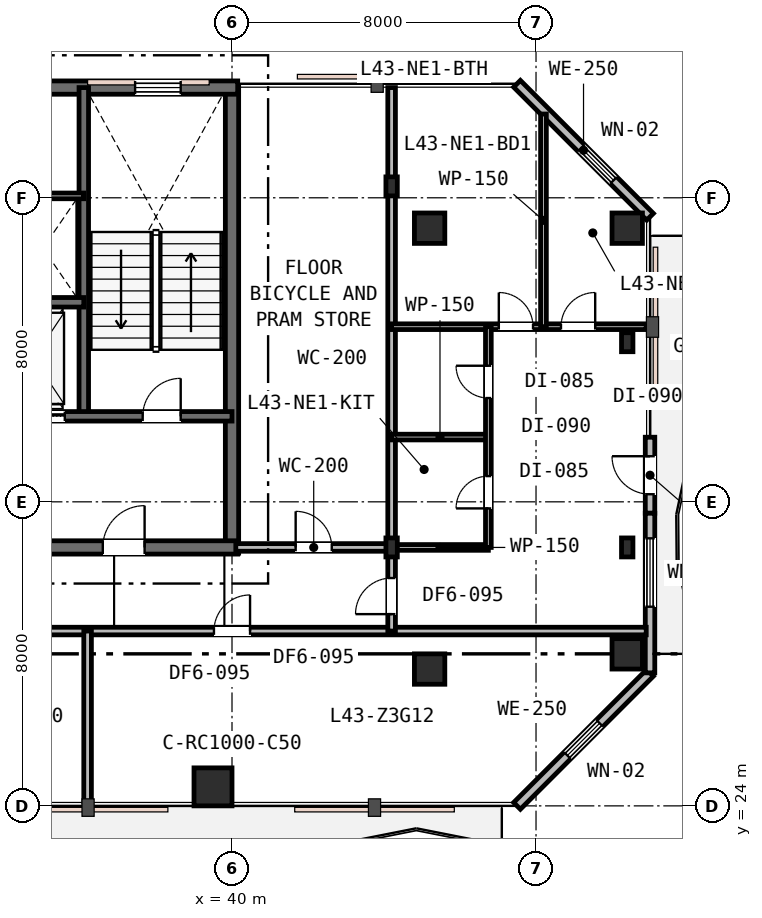
"""IFC4 building model, lengths in metres.
Left out: names, types, materials, properties, quantities, classifications, styles, units other than length and angle.
Written with IfcOpenShell. Run it as: python <this file> out.ifc"""

import sys

from ifc_helpers import new_model, si_unit, direction, frame, frame_2d, origin, origin_2d, place, context, subcontext, project, spatial, rectangle, i_section, extrude, element, fill, save


model = new_model("IFC4")
c1 = context("Model", 3, precision=1e-05, world=origin(), true_north=direction((0.0, 1.0)))
c2 = subcontext(c1, "Body", "Model", "MODEL_VIEW")
j1 = project(units=[si_unit("LENGTHUNIT", "METRE"), si_unit("PLANEANGLEUNIT", "RADIAN")], contexts=[c1])
p1 = place(None, origin())
s1 = spatial("IfcSite", under=j1, at=p1, CompositionType="ELEMENT")
p2 = place(p1, origin())
s2 = spatial("IfcBuilding", under=s1, at=p2, CompositionType="ELEMENT")
p3 = place(p2, frame((0.0, 0.0, 168.6)))
s3 = spatial("IfcBuildingStorey", under=s2, at=p3, CompositionType="ELEMENT", Elevation=168.6)
p4 = place(p3, frame((40.0, 30.65, 0.0), z_axis=(0.0, 0.0, 1.0), x_axis=(0.0, 1.0, 0.0)))
e1 = element("IfcWall", 1, at=p4, inside=s3, PredefinedType="SHEAR", context=c2, shape_type="SweptSolid", body=[
    extrude(rectangle(XDim=12.3, YDim=0.35, at=frame_2d((6.15, 0.0))), origin(), (0.0, 0.0, 1.0), 3.6),
])
p5 = place(p3, frame((15.85, 42.9, 0.0), z_axis=(0.0, 0.0, 1.0), x_axis=(1.0, 0.0, 0.0)))
e2 = element("IfcWall", 2, at=p5, inside=s3, PredefinedType="SHEAR", context=c2, shape_type="SweptSolid", body=[
    extrude(rectangle(XDim=24.3, YDim=0.35, at=frame_2d((12.15, 0.0))), origin(), (0.0, 0.0, 1.0), 3.6),
])
p6 = place(p5, frame((1.6, 0.0, 0.95)))
e3 = element("IfcOpeningElement", 3, at=p6, cuts=e2, PredefinedType="OPENING", context=c2, shape_type="SweptSolid", body=[
    extrude(rectangle(XDim=1.2, YDim=1.6, at=frame_2d((0.6, 0.8))), frame((0.0, 0.185, 0.0), z_axis=(0.0, -1.0, 0.0), x_axis=(1.0, 0.0, 0.0)), (0.0, 0.0, 1.0), 0.37),
])
p7 = place(p5, frame((16.5, 0.0, 0.95)))
e4 = element("IfcOpeningElement", 4, at=p7, cuts=e2, PredefinedType="OPENING", context=c2, shape_type="SweptSolid", body=[
    extrude(rectangle(XDim=1.2, YDim=1.6, at=frame_2d((0.6, 0.8))), frame((0.0, 0.185, 0.0), z_axis=(0.0, -1.0, 0.0), x_axis=(1.0, 0.0, 0.0)), (0.0, 0.0, 1.0), 0.37),
])
p8 = place(p5, frame((21.6, 0.0, 0.95)))
e5 = element("IfcOpeningElement", 5, at=p8, cuts=e2, PredefinedType="OPENING", context=c2, shape_type="SweptSolid", body=[
    extrude(rectangle(XDim=1.2, YDim=1.6, at=frame_2d((0.6, 0.8))), frame((0.0, 0.185, 0.0), z_axis=(0.0, -1.0, 0.0), x_axis=(1.0, 0.0, 0.0)), (0.0, 0.0, 1.0), 0.37),
])
p9 = place(p3, frame((28.95, 30.8, 0.0), z_axis=(0.0, 0.0, 1.0), x_axis=(1.0, 0.0, 0.0)))
e6 = element("IfcWall", 6, at=p9, inside=s3, PredefinedType="SHEAR", context=c2, shape_type="SweptSolid", body=[
    extrude(rectangle(XDim=11.2, YDim=0.35, at=frame_2d((5.6, 0.0))), origin(), (0.0, 0.0, 1.0), 3.6),
])
p10 = place(p9, frame((7.65, 0.0, 0.0)))
e7 = element("IfcOpeningElement", 7, at=p10, cuts=e6, PredefinedType="OPENING", context=c2, shape_type="SweptSolid", body=[
    extrude(rectangle(XDim=1.1, YDim=2.15, at=frame_2d((0.55, 1.075))), frame((0.0, 0.185, 0.0), z_axis=(0.0, -1.0, 0.0), x_axis=(1.0, 0.0, 0.0)), (0.0, 0.0, 1.0), 0.37),
])
p11 = place(p3, frame((36.1, 34.25, 0.0), z_axis=(0.0, 0.0, 1.0), x_axis=(0.0, 1.0, 0.0)))
e8 = element("IfcWall", 8, at=p11, inside=s3, PredefinedType="SHEAR", context=c2, shape_type="SweptSolid", body=[
    extrude(rectangle(XDim=8.65, YDim=0.25, at=frame_2d((4.325, 0.0))), origin(), (0.0, 0.0, 1.0), 3.6),
])
p12 = place(p3, frame((33.95, 34.25, 0.0), z_axis=(0.0, 0.0, 1.0), x_axis=(1.0, 0.0, 0.0)))
e9 = element("IfcWall", 9, at=p12, inside=s3, PredefinedType="SHEAR", context=c2, shape_type="SweptSolid", body=[
    extrude(rectangle(XDim=6.05, YDim=0.25, at=frame_2d((3.025, 0.0))), origin(), (0.0, 0.0, 1.0), 3.6),
])
p13 = place(p12, frame((3.7, 0.0, 0.0)))
e10 = element("IfcOpeningElement", 10, at=p13, cuts=e9, PredefinedType="OPENING", context=c2, shape_type="SweptSolid", body=[
    extrude(rectangle(XDim=1.0, YDim=2.15, at=frame_2d((0.5, 1.075))), frame((0.0, 0.135, 0.0), z_axis=(0.0, -1.0, 0.0), x_axis=(1.0, 0.0, 0.0)), (0.0, 0.0, 1.0), 0.27),
])
p14 = place(p12, frame((0.55, 0.0, 0.0)))
e11 = element("IfcOpeningElement", 11, at=p14, cuts=e9, PredefinedType="OPENING", context=c2, shape_type="SweptSolid", body=[
    extrude(rectangle(XDim=1.1, YDim=2.15, at=frame_2d((0.55, 1.075))), frame((0.0, 0.135, 0.0), z_axis=(0.0, -1.0, 0.0), x_axis=(1.0, 0.0, 0.0)), (0.0, 0.0, 1.0), 0.27),
])
p15 = place(p3, frame((19.9, 37.25, 0.0), z_axis=(0.0, 0.0, 1.0), x_axis=(1.0, 0.0, 0.0)))
e12 = element("IfcWall", 12, at=p15, inside=s3, PredefinedType="SHEAR", context=c2, shape_type="SweptSolid", body=[
    extrude(rectangle(XDim=16.2, YDim=0.25, at=frame_2d((8.1, 0.0))), origin(), (0.0, 0.0, 1.0), 3.6),
])
p16 = place(p15, frame((12.55, 0.0, 0.0)))
e13 = element("IfcOpeningElement", 13, at=p16, cuts=e12, PredefinedType="OPENING", context=c2, shape_type="SweptSolid", body=[
    extrude(rectangle(XDim=0.9, YDim=2.15, at=frame_2d((0.45, 1.075))), frame((0.0, 0.135, 0.0), z_axis=(0.0, -1.0, 0.0), x_axis=(1.0, 0.0, 0.0)), (0.0, 0.0, 1.0), 0.27),
])
p17 = place(p15, frame((2.5, 0.0, 0.0)))
e14 = element("IfcOpeningElement", 14, at=p17, cuts=e12, PredefinedType="OPENING", context=c2, shape_type="SweptSolid", body=[
    extrude(rectangle(XDim=1.05, YDim=2.15, at=frame_2d((0.525, 1.075))), frame((0.0, 0.135, 0.0), z_axis=(0.0, -1.0, 0.0), x_axis=(1.0, 0.0, 0.0)), (0.0, 0.0, 1.0), 0.27),
])
p18 = place(p15, frame((4.4, 0.0, 0.0)))
e15 = element("IfcOpeningElement", 15, at=p18, cuts=e12, PredefinedType="OPENING", context=c2, shape_type="SweptSolid", body=[
    extrude(rectangle(XDim=1.05, YDim=2.15, at=frame_2d((0.525, 1.075))), frame((0.0, 0.135, 0.0), z_axis=(0.0, -1.0, 0.0), x_axis=(1.0, 0.0, 0.0)), (0.0, 0.0, 1.0), 0.27),
])
p19 = place(p15, frame((6.3, 0.0, 0.0)))
e16 = element("IfcOpeningElement", 16, at=p19, cuts=e12, PredefinedType="OPENING", context=c2, shape_type="SweptSolid", body=[
    extrude(rectangle(XDim=1.05, YDim=2.15, at=frame_2d((0.525, 1.075))), frame((0.0, 0.135, 0.0), z_axis=(0.0, -1.0, 0.0), x_axis=(1.0, 0.0, 0.0)), (0.0, 0.0, 1.0), 0.27),
])
p20 = place(p3, frame((39.5, 24.5, 0.0), z_axis=(0.0, 0.0, 1.0), x_axis=(1.0, 0.0, 0.0)))
e17 = element("IfcColumn", 17, at=p20, inside=s3, PredefinedType="COLUMN", context=c2, shape_type="SweptSolid", body=[
    extrude(rectangle(XDim=1.0, YDim=1.0, at=origin_2d()), origin(), (0.0, 0.0, 1.0), 3.6),
])
for number, where, z_axis, x_axis in (
    (18, (45.2, 27.6, 0.0), (0.0, 0.0, 1.0), (1.0, 0.0, 0.0)),
    (19, (45.2, 39.2, 0.0), (0.0, 0.0, 1.0), (1.0, 0.0, 0.0)),
    (20, (50.4, 28.0, 0.0), (0.0, 0.0, 1.0), (1.0, 0.0, 0.0)),
    (21, (50.4, 39.2, 0.0), (0.0, 0.0, 1.0), (1.0, 0.0, 0.0)),
):
    element("IfcColumn", number, at=place(p3, frame(where, z_axis=z_axis, x_axis=x_axis)), inside=s3, PredefinedType="COLUMN", context=c2, shape_type="SweptSolid", body=[
        extrude(rectangle(XDim=0.8, YDim=0.8, at=origin_2d()), origin(), (0.0, 0.0, 1.0), 3.6),
    ])
for number, where, z_axis, x_axis in (
    (22, (44.2, 30.8, 0.0), (0.0, 0.0, 1.0), (1.0, 0.0, 0.0)),
    (23, (44.2, 40.3, 0.0), (0.0, 0.0, 1.0), (1.0, 0.0, 0.0)),
    (24, (50.4, 30.8, 0.0), (0.0, 0.0, 1.0), (1.0, 0.0, 0.0)),
    (25, (50.4, 36.2, 0.0), (0.0, 0.0, 1.0), (1.0, 0.0, 0.0)),
):
    element("IfcColumn", number, at=place(p3, frame(where, z_axis=z_axis, x_axis=x_axis)), inside=s3, PredefinedType="COLUMN", context=c2, shape_type="SweptSolid", body=[
        extrude(i_section(OverallWidth=0.3, OverallDepth=0.5, WebThickness=0.015, FlangeThickness=0.028, FilletRadius=0.027, at=origin_2d()), origin(), (0.0, 0.0, 1.0), 3.6),
    ])
p21 = place(p3, frame((47.5, 24.0, 0.0), z_axis=(0.0, 0.0, 1.0), x_axis=(0.707106781187, 0.707106781187, 0.0)))
e26 = element("IfcWall", 26, at=p21, inside=s3, PredefinedType="STANDARD", context=c2, shape_type="SweptSolid", body=[
    extrude(rectangle(XDim=4.95, YDim=0.25, at=frame_2d((2.475, 0.0))), origin(), (0.0, 0.0, 1.0), 3.33),
])
p22 = place(p21, frame((1.875, 0.0, 0.85)))
e27 = element("IfcOpeningElement", 27, at=p22, cuts=e26, PredefinedType="OPENING", context=c2, shape_type="SweptSolid", body=[
    extrude(rectangle(XDim=1.2, YDim=1.6, at=frame_2d((0.6, 0.8))), frame((0.0, 0.135, 0.0), z_axis=(0.0, -1.0, 0.0), x_axis=(1.0, 0.0, 0.0)), (0.0, 0.0, 1.0), 0.27),
])
p23 = place(p3, frame((51.0, 31.7, 0.0), z_axis=(0.0, 0.0, 1.0), x_axis=(0.0, 1.0, 0.0)))
e28 = element("IfcWall", 28, at=p23, inside=s3, PredefinedType="STANDARD", context=c2, shape_type="SweptSolid", body=[
    extrude(rectangle(XDim=2.0, YDim=0.25, at=frame_2d((1.0, 0.0))), origin(), (0.0, 0.0, 1.0), 3.33),
])
p24 = place(p23, frame((0.5, 0.0, 0.0)))
e29 = element("IfcOpeningElement", 29, at=p24, cuts=e28, PredefinedType="OPENING", context=c2, shape_type="SweptSolid", body=[
    extrude(rectangle(XDim=1.0, YDim=2.15, at=frame_2d((0.5, 1.075))), frame((0.0, 0.135, 0.0), z_axis=(0.0, -1.0, 0.0), x_axis=(1.0, 0.0, 0.0)), (0.0, 0.0, 1.0), 0.27),
])
p25 = place(p3, frame((51.0, 27.5, 0.0), z_axis=(0.0, 0.0, 1.0), x_axis=(0.0, 1.0, 0.0)))
e30 = element("IfcWall", 30, at=p25, inside=s3, PredefinedType="STANDARD", context=c2, shape_type="SweptSolid", body=[
    extrude(rectangle(XDim=4.2, YDim=0.25, at=frame_2d((2.1, 0.0))), origin(), (0.0, 0.0, 1.0), 3.33),
])
p26 = place(p25, frame((1.74, 0.0, 0.75)))
e31 = element("IfcOpeningElement", 31, at=p26, cuts=e30, PredefinedType="OPENING", context=c2, shape_type="SweptSolid", body=[
    extrude(rectangle(XDim=1.8, YDim=1.85, at=frame_2d((0.9, 0.925))), frame((0.0, 0.135, 0.0), z_axis=(0.0, -1.0, 0.0), x_axis=(1.0, 0.0, 0.0)), (0.0, 0.0, 1.0), 0.27),
])
p27 = place(p3, frame((51.0, 39.5, 0.0), z_axis=(0.0, 0.0, 1.0), x_axis=(-0.707106781187, 0.707106781187, 0.0)))
e32 = element("IfcWall", 32, at=p27, inside=s3, PredefinedType="STANDARD", context=c2, shape_type="SweptSolid", body=[
    extrude(rectangle(XDim=4.95, YDim=0.25, at=frame_2d((2.475, 0.0))), origin(), (0.0, 0.0, 1.0), 3.33),
])
p28 = place(p27, frame((1.357, 0.0, 0.85)))
e33 = element("IfcOpeningElement", 33, at=p28, cuts=e32, PredefinedType="OPENING", context=c2, shape_type="SweptSolid", body=[
    extrude(rectangle(XDim=1.2, YDim=1.6, at=frame_2d((0.6, 0.8))), frame((0.0, 0.135, 0.0), z_axis=(0.0, -1.0, 0.0), x_axis=(1.0, 0.0, 0.0)), (0.0, 0.0, 1.0), 0.27),
])
p29 = place(p3, frame((34.05, 40.05, 0.0), z_axis=(0.0, 0.0, 1.0), x_axis=(1.0, 0.0, 0.0)))
e34 = element("IfcWall", 34, at=p29, inside=s3, PredefinedType="PARTITIONING", context=c2, shape_type="SweptSolid", body=[
    extrude(rectangle(XDim=2.05, YDim=0.15, at=frame_2d((1.025, 0.0))), origin(), (0.0, 0.0, 1.0), 3.33),
])
p30 = place(p3, frame((13.6, 28.6, 0.0), z_axis=(0.0, 0.0, 1.0), x_axis=(1.0, 0.0, 0.0)))
e35 = element("IfcWall", 35, at=p30, inside=s3, PredefinedType="PARTITIONING", context=c2, shape_type="SweptSolid", body=[
    extrude(rectangle(XDim=37.3, YDim=0.2, at=frame_2d((18.65, 0.0))), origin(), (0.0, 0.0, 1.0), 2.92),
])
p31 = place(p30, frame((16.025, 0.0, 0.0)))
e36 = element("IfcOpeningElement", 36, at=p31, cuts=e35, PredefinedType="OPENING", context=c2, shape_type="SweptSolid", body=[
    extrude(rectangle(XDim=0.95, YDim=2.15, at=frame_2d((0.475, 1.075))), frame((0.0, 0.11, 0.0), z_axis=(0.0, -1.0, 0.0), x_axis=(1.0, 0.0, 0.0)), (0.0, 0.0, 1.0), 0.22),
])
p32 = place(p30, frame((25.925, 0.0, 0.0)))
e37 = element("IfcOpeningElement", 37, at=p32, cuts=e35, PredefinedType="OPENING", context=c2, shape_type="SweptSolid", body=[
    extrude(rectangle(XDim=0.95, YDim=2.15, at=frame_2d((0.475, 1.075))), frame((0.0, 0.11, 0.0), z_axis=(0.0, -1.0, 0.0), x_axis=(1.0, 0.0, 0.0)), (0.0, 0.0, 1.0), 0.22),
])
p33 = place(p3, frame((40.1, 30.8, 0.0), z_axis=(0.0, 0.0, 1.0), x_axis=(1.0, 0.0, 0.0)))
e38 = element("IfcWall", 38, at=p33, inside=s3, PredefinedType="PARTITIONING", context=c2, shape_type="SweptSolid", body=[
    extrude(rectangle(XDim=4.1, YDim=0.2, at=frame_2d((2.05, 0.0))), origin(), (0.0, 0.0, 1.0), 2.92),
])
p34 = place(p33, frame((1.575, 0.0, 0.0)))
e39 = element("IfcOpeningElement", 39, at=p34, cuts=e38, PredefinedType="OPENING", context=c2, shape_type="SweptSolid", body=[
    extrude(rectangle(XDim=0.95, YDim=2.15, at=frame_2d((0.475, 1.075))), frame((0.0, 0.11, 0.0), z_axis=(0.0, -1.0, 0.0), x_axis=(1.0, 0.0, 0.0)), (0.0, 0.0, 1.0), 0.22),
])
p35 = place(p3, frame((44.2, 28.6, 0.0), z_axis=(0.0, 0.0, 1.0), x_axis=(0.0, 1.0, 0.0)))
e40 = element("IfcWall", 40, at=p35, inside=s3, PredefinedType="PARTITIONING", context=c2, shape_type="SweptSolid", body=[
    extrude(rectangle(XDim=14.3, YDim=0.2, at=frame_2d((7.15, 0.0))), origin(), (0.0, 0.0, 1.0), 2.92),
])
p36 = place(p35, frame((0.445, 0.0, 0.0)))
e41 = element("IfcOpeningElement", 41, at=p36, cuts=e40, PredefinedType="OPENING", context=c2, shape_type="SweptSolid", body=[
    extrude(rectangle(XDim=0.95, YDim=2.15, at=frame_2d((0.475, 1.075))), frame((0.0, 0.11, 0.0), z_axis=(0.0, -1.0, 0.0), x_axis=(1.0, 0.0, 0.0)), (0.0, 0.0, 1.0), 0.22),
])
for number, where, z_axis, x_axis in (
    (42, (44.2, 30.8, 0.0), (0.0, 0.0, 1.0), (1.0, 0.0, 0.0)),
    (43, (44.2, 33.704, 0.0), (0.0, 0.0, 1.0), (1.0, 0.0, 0.0)),
):
    element("IfcWall", number, at=place(p3, frame(where, z_axis=z_axis, x_axis=x_axis)), inside=s3, PredefinedType="PARTITIONING", context=c2, shape_type="SweptSolid", body=[
        extrude(rectangle(XDim=2.546, YDim=0.15, at=frame_2d((1.273, 0.0))), origin(), (0.0, 0.0, 1.0), 2.92),
    ])
p37 = place(p3, frame((44.2, 36.608, 0.0), z_axis=(0.0, 0.0, 1.0), x_axis=(1.0, 0.0, 0.0)))
e44 = element("IfcWall", 44, at=p37, inside=s3, PredefinedType="PARTITIONING", context=c2, shape_type="SweptSolid", body=[
    extrude(rectangle(XDim=6.7, YDim=0.15, at=frame_2d((3.35, 0.0))), origin(), (0.0, 0.0, 1.0), 2.92),
])
p38 = place(p37, frame((2.821, 0.0, 0.0)))
e45 = element("IfcOpeningElement", 45, at=p38, cuts=e44, PredefinedType="OPENING", context=c2, shape_type="SweptSolid", body=[
    extrude(rectangle(XDim=0.9, YDim=2.15, at=frame_2d((0.45, 1.075))), frame((0.0, 0.085, 0.0), z_axis=(0.0, -1.0, 0.0), x_axis=(1.0, 0.0, 0.0)), (0.0, 0.0, 1.0), 0.17),
])
p39 = place(p37, frame((4.457, 0.0, 0.0)))
e46 = element("IfcOpeningElement", 46, at=p39, cuts=e44, PredefinedType="OPENING", context=c2, shape_type="SweptSolid", body=[
    extrude(rectangle(XDim=0.9, YDim=2.15, at=frame_2d((0.45, 1.075))), frame((0.0, 0.085, 0.0), z_axis=(0.0, -1.0, 0.0), x_axis=(1.0, 0.0, 0.0)), (0.0, 0.0, 1.0), 0.17),
])
p40 = place(p3, frame((46.746, 30.8, 0.0), z_axis=(0.0, 0.0, 1.0), x_axis=(0.0, 1.0, 0.0)))
e47 = element("IfcWall", 47, at=p40, inside=s3, PredefinedType="PARTITIONING", context=c2, shape_type="SweptSolid", body=[
    extrude(rectangle(XDim=5.808, YDim=0.15, at=frame_2d((2.904, 0.0))), origin(), (0.0, 0.0, 1.0), 2.92),
])
p41 = place(p40, frame((1.027, 0.0, 0.0)))
e48 = element("IfcOpeningElement", 48, at=p41, cuts=e47, PredefinedType="OPENING", context=c2, shape_type="SweptSolid", body=[
    extrude(rectangle(XDim=0.85, YDim=2.15, at=frame_2d((0.425, 1.075))), frame((0.0, 0.085, 0.0), z_axis=(0.0, -1.0, 0.0), x_axis=(1.0, 0.0, 0.0)), (0.0, 0.0, 1.0), 0.17),
])
p42 = place(p40, frame((3.931, 0.0, 0.0)))
e49 = element("IfcOpeningElement", 49, at=p42, cuts=e47, PredefinedType="OPENING", context=c2, shape_type="SweptSolid", body=[
    extrude(rectangle(XDim=0.85, YDim=2.15, at=frame_2d((0.425, 1.075))), frame((0.0, 0.085, 0.0), z_axis=(0.0, -1.0, 0.0), x_axis=(1.0, 0.0, 0.0)), (0.0, 0.0, 1.0), 0.17),
])
p43 = place(p3, frame((48.196, 36.608, 0.0), z_axis=(0.0, 0.0, 1.0), x_axis=(0.0, 1.0, 0.0)))
e50 = element("IfcWall", 50, at=p43, inside=s3, PredefinedType="PARTITIONING", context=c2, shape_type="SweptSolid", body=[
    extrude(rectangle(XDim=5.596, YDim=0.15, at=frame_2d((2.798, 0.0))), origin(), (0.0, 0.0, 1.0), 3.02),
])
p44 = place(p3, frame((36.2, 24.1, 0.0), z_axis=(0.0, 0.0, 1.0), x_axis=(0.0, 1.0, 0.0)))
e51 = element("IfcWall", 51, at=p44, inside=s3, PredefinedType="PARTITIONING", context=c2, shape_type="SweptSolid", body=[
    extrude(rectangle(XDim=4.5, YDim=0.2, at=frame_2d((2.25, 0.0))), origin(), (0.0, 0.0, 1.0), 3.02),
])
p45 = place(p8, origin())
e52 = element("IfcWindow", 52, at=p45, inside=s3, PartitioningType="SINGLE_PANEL", PredefinedType="WINDOW", context=c2, shape_type="SweptSolid", body=[
    extrude(rectangle(XDim=1.2, YDim=1.6, at=frame_2d((0.6, 0.8))), frame((0.0, 0.03, 0.0), z_axis=(0.0, -1.0, 0.0), x_axis=(1.0, 0.0, 0.0)), (0.0, 0.0, 1.0), 0.06),
])
fill(e5, e52)
p46 = place(p22, origin())
e53 = element("IfcWindow", 53, at=p46, inside=s3, PartitioningType="SINGLE_PANEL", PredefinedType="WINDOW", context=c2, shape_type="SweptSolid", body=[
    extrude(rectangle(XDim=1.2, YDim=1.6, at=frame_2d((0.6, 0.8))), frame((0.0, 0.03, 0.0), z_axis=(0.0, -1.0, 0.0), x_axis=(1.0, 0.0, 0.0)), (0.0, 0.0, 1.0), 0.06),
])
fill(e27, e53)
p47 = place(p24, origin())
e54 = element("IfcDoor", 54, at=p47, inside=s3, OperationType="SINGLE_SWING_RIGHT", PredefinedType="DOOR", context=c2, shape_type="SweptSolid", body=[
    extrude(rectangle(XDim=1.0, YDim=2.15, at=frame_2d((0.5, 1.075))), frame((0.0, 0.025, 0.0), z_axis=(0.0, -1.0, 0.0), x_axis=(1.0, 0.0, 0.0)), (0.0, 0.0, 1.0), 0.05),
])
fill(e29, e54)
p48 = place(p26, origin())
e55 = element("IfcWindow", 55, at=p48, inside=s3, PartitioningType="SINGLE_PANEL", PredefinedType="WINDOW", context=c2, shape_type="SweptSolid", body=[
    extrude(rectangle(XDim=1.8, YDim=1.85, at=frame_2d((0.9, 0.925))), frame((0.0, 0.03, 0.0), z_axis=(0.0, -1.0, 0.0), x_axis=(1.0, 0.0, 0.0)), (0.0, 0.0, 1.0), 0.06),
])
fill(e31, e55)
p49 = place(p28, origin())
e56 = element("IfcWindow", 56, at=p49, inside=s3, PartitioningType="SINGLE_PANEL", PredefinedType="WINDOW", context=c2, shape_type="SweptSolid", body=[
    extrude(rectangle(XDim=1.2, YDim=1.6, at=frame_2d((0.6, 0.8))), frame((0.0, 0.03, 0.0), z_axis=(0.0, -1.0, 0.0), x_axis=(1.0, 0.0, 0.0)), (0.0, 0.0, 1.0), 0.06),
])
fill(e33, e56)
p50 = place(p13, origin())
e57 = element("IfcDoor", 57, at=p50, inside=s3, OperationType="SINGLE_SWING_RIGHT", PredefinedType="DOOR", context=c2, shape_type="SweptSolid", body=[
    extrude(rectangle(XDim=1.0, YDim=2.15, at=frame_2d((0.5, 1.075))), frame((0.0, 0.025, 0.0), z_axis=(0.0, -1.0, 0.0), x_axis=(1.0, 0.0, 0.0)), (0.0, 0.0, 1.0), 0.05),
])
fill(e10, e57)
p51 = place(p10, origin())
e58 = element("IfcDoor", 58, at=p51, inside=s3, OperationType="SINGLE_SWING_RIGHT", PredefinedType="DOOR", context=c2, shape_type="SweptSolid", body=[
    extrude(rectangle(XDim=1.1, YDim=2.15, at=frame_2d((0.55, 1.075))), frame((0.0, 0.025, 0.0), z_axis=(0.0, -1.0, 0.0), x_axis=(1.0, 0.0, 0.0)), (0.0, 0.0, 1.0), 0.05),
])
fill(e7, e58)
p52 = place(p34, origin())
e59 = element("IfcDoor", 59, at=p52, inside=s3, OperationType="SINGLE_SWING_LEFT", PredefinedType="DOOR", context=c2, shape_type="SweptSolid", body=[
    extrude(rectangle(XDim=0.95, YDim=2.15, at=frame_2d((0.475, 1.075))), frame((0.0, 0.025, 0.0), z_axis=(0.0, -1.0, 0.0), x_axis=(1.0, 0.0, 0.0)), (0.0, 0.0, 1.0), 0.05),
])
fill(e39, e59)
p53 = place(p36, origin())
e60 = element("IfcDoor", 60, at=p53, inside=s3, OperationType="SINGLE_SWING_LEFT", PredefinedType="DOOR", context=c2, shape_type="SweptSolid", body=[
    extrude(rectangle(XDim=0.95, YDim=2.15, at=frame_2d((0.475, 1.075))), frame((0.0, 0.025, 0.0), z_axis=(0.0, -1.0, 0.0), x_axis=(1.0, 0.0, 0.0)), (0.0, 0.0, 1.0), 0.05),
])
fill(e41, e60)
p54 = place(p41, origin())
e61 = element("IfcDoor", 61, at=p54, inside=s3, OperationType="SINGLE_SWING_LEFT", PredefinedType="DOOR", context=c2, shape_type="SweptSolid", body=[
    extrude(rectangle(XDim=0.85, YDim=2.15, at=frame_2d((0.425, 1.075))), frame((0.0, 0.025, 0.0), z_axis=(0.0, -1.0, 0.0), x_axis=(1.0, 0.0, 0.0)), (0.0, 0.0, 1.0), 0.05),
])
fill(e48, e61)
p55 = place(p42, origin())
e62 = element("IfcDoor", 62, at=p55, inside=s3, OperationType="SINGLE_SWING_RIGHT", PredefinedType="DOOR", context=c2, shape_type="SweptSolid", body=[
    extrude(rectangle(XDim=0.85, YDim=2.15, at=frame_2d((0.425, 1.075))), frame((0.0, 0.025, 0.0), z_axis=(0.0, -1.0, 0.0), x_axis=(1.0, 0.0, 0.0)), (0.0, 0.0, 1.0), 0.05),
])
fill(e49, e62)
p56 = place(p38, origin())
e63 = element("IfcDoor", 63, at=p56, inside=s3, OperationType="SINGLE_SWING_LEFT", PredefinedType="DOOR", context=c2, shape_type="SweptSolid", body=[
    extrude(rectangle(XDim=0.9, YDim=2.15, at=frame_2d((0.45, 1.075))), frame((0.0, 0.025, 0.0), z_axis=(0.0, -1.0, 0.0), x_axis=(1.0, 0.0, 0.0)), (0.0, 0.0, 1.0), 0.05),
])
fill(e45, e63)
p57 = place(p39, origin())
e64 = element("IfcDoor", 64, at=p57, inside=s3, OperationType="SINGLE_SWING_RIGHT", PredefinedType="DOOR", context=c2, shape_type="SweptSolid", body=[
    extrude(rectangle(XDim=0.9, YDim=2.15, at=frame_2d((0.45, 1.075))), frame((0.0, 0.025, 0.0), z_axis=(0.0, -1.0, 0.0), x_axis=(1.0, 0.0, 0.0)), (0.0, 0.0, 1.0), 0.05),
])
fill(e46, e64)
p58 = place(p32, origin())
e65 = element("IfcDoor", 65, at=p58, inside=s3, OperationType="SINGLE_SWING_RIGHT", PredefinedType="DOOR", context=c2, shape_type="SweptSolid", body=[
    extrude(rectangle(XDim=0.95, YDim=2.15, at=frame_2d((0.475, 1.075))), frame((0.0, 0.025, 0.0), z_axis=(0.0, -1.0, 0.0), x_axis=(1.0, 0.0, 0.0)), (0.0, 0.0, 1.0), 0.05),
])
fill(e37, e65)
p59 = place(p14, origin())
e66 = element("IfcDoor", 66, at=p59, inside=s3, OperationType="DOUBLE_DOOR_SLIDING", PredefinedType="DOOR", context=c2, shape_type="SweptSolid", body=[
    extrude(rectangle(XDim=1.1, YDim=2.15, at=frame_2d((0.55, 1.075))), frame((0.0, 0.025, 0.0), z_axis=(0.0, -1.0, 0.0), x_axis=(1.0, 0.0, 0.0)), (0.0, 0.0, 1.0), 0.05),
])
fill(e11, e66)
save(model, sys.argv[1])
